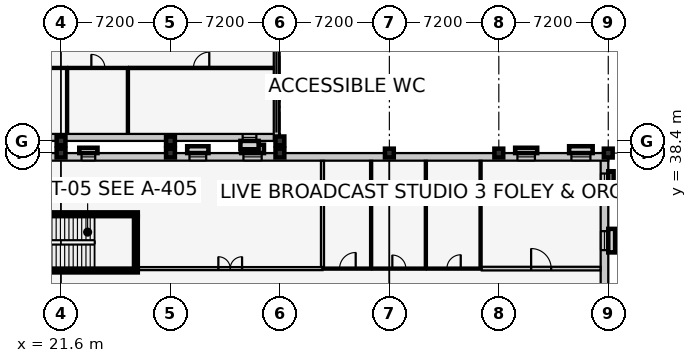
"""IFC4 building model, lengths in metres.
Left out: names, types, materials, properties, quantities, classifications, styles, units other than length and angle.
Written with IfcOpenShell. Run it as: python <this file> out.ifc"""

import sys

from ifc_helpers import new_model, si_unit, direction, frame, frame_2d, origin, origin_2d, place, context, subcontext, project, spatial, rectangle, extrude, element, fill, save


model = new_model("IFC4")
c1 = context("Model", 3, precision=1e-05, world=origin(), true_north=direction((0.0, 1.0)))
c2 = subcontext(c1, "Body", "Model", "MODEL_VIEW")
j1 = project(units=[si_unit("LENGTHUNIT", "METRE"), si_unit("PLANEANGLEUNIT", "RADIAN")], contexts=[c1])
p1 = place(None, origin())
s1 = spatial("IfcSite", under=j1, at=p1, CompositionType="ELEMENT")
p2 = place(p1, origin())
s2 = spatial("IfcBuilding", under=s1, at=p2, CompositionType="ELEMENT")
p3 = place(p2, origin())
s3 = spatial("IfcBuildingStorey", under=s2, at=p3, CompositionType="ELEMENT", Elevation=0.0)
for number, where, z_axis, x_axis in (
    (1, (21.6, 38.4, 0.0), (0.0, 0.0, 1.0), (1.0, 0.0, 0.0)),
    (2, (28.8, 38.4, 0.0), (0.0, 0.0, 1.0), (1.0, 0.0, 0.0)),
    (3, (36.0, 38.4, 0.0), (0.0, 0.0, 1.0), (1.0, 0.0, 0.0)),
    (4, (43.2, 38.4, 0.0), (0.0, 0.0, 1.0), (1.0, 0.0, 0.0)),
    (5, (50.4, 38.4, 0.0), (0.0, 0.0, 1.0), (1.0, 0.0, 0.0)),
    (6, (57.6, 38.4, 0.0), (0.0, 0.0, 1.0), (1.0, 0.0, 0.0)),
    (7, (21.6, 39.2, 0.0), (0.0, 0.0, 1.0), (1.0, 0.0, 0.0)),
    (8, (28.8, 39.2, 0.0), (0.0, 0.0, 1.0), (1.0, 0.0, 0.0)),
    (9, (36.0, 39.2, 0.0), (0.0, 0.0, 1.0), (1.0, 0.0, 0.0)),
):
    element("IfcColumn", number, at=place(p3, frame(where, z_axis=z_axis, x_axis=x_axis)), inside=s3, PredefinedType="COLUMN", context=c2, shape_type="SweptSolid", body=[
        extrude(rectangle(XDim=0.58, YDim=0.58, at=origin_2d()), origin(), (0.0, 0.0, 1.0), 5.4),
    ])
p4 = place(p3, frame((57.35, 38.4, 0.0), z_axis=(0.0, 0.0, 1.0), x_axis=(0.0, -1.0, 0.0)))
e10 = element("IfcWall", 10, at=p4, inside=s3, PredefinedType="SOLIDWALL", context=c2, shape_type="SweptSolid", body=[
    extrude(rectangle(XDim=38.4, YDim=0.5, at=frame_2d((19.2, 0.0))), origin(), (0.0, 0.0, 1.0), 4.255),
])
p5 = place(p4, frame((10.9, 0.0, 0.0)))
e11 = element("IfcOpeningElement", 11, at=p5, cuts=e10, PredefinedType="OPENING", context=c2, shape_type="SweptSolid", body=[
    extrude(rectangle(XDim=2.2, YDim=2.4, at=frame_2d((1.1, 1.2))), frame((0.0, 0.262, 0.0), z_axis=(0.0, -1.0, 0.0), x_axis=(1.0, 0.0, 0.0)), (0.0, 0.0, 1.0), 0.524),
])
p6 = place(p4, frame((1.345, 0.0, 0.9)))
e12 = element("IfcOpeningElement", 12, at=p6, cuts=e10, PredefinedType="OPENING", context=c2, shape_type="SweptSolid", body=[
    extrude(rectangle(XDim=1.15, YDim=1.45, at=frame_2d((0.575, 0.725))), frame((0.0, 0.262, 0.0), z_axis=(0.0, -1.0, 0.0), x_axis=(1.0, 0.0, 0.0)), (0.0, 0.0, 1.0), 0.524),
])
p7 = place(p4, frame((5.135, 0.0, 0.9)))
e13 = element("IfcOpeningElement", 13, at=p7, cuts=e10, PredefinedType="OPENING", context=c2, shape_type="SweptSolid", body=[
    extrude(rectangle(XDim=1.25, YDim=1.45, at=frame_2d((0.625, 0.725))), frame((0.0, 0.262, 0.0), z_axis=(0.0, -1.0, 0.0), x_axis=(1.0, 0.0, 0.0)), (0.0, 0.0, 1.0), 0.524),
])
p8 = place(p4, frame((20.595, 0.0, 0.9)))
e14 = element("IfcOpeningElement", 14, at=p8, cuts=e10, PredefinedType="OPENING", context=c2, shape_type="SweptSolid", body=[
    extrude(rectangle(XDim=1.05, YDim=1.6, at=frame_2d((0.525, 0.8))), frame((0.0, 0.262, 0.0), z_axis=(0.0, -1.0, 0.0), x_axis=(1.0, 0.0, 0.0)), (0.0, 0.0, 1.0), 0.524),
])
p9 = place(p4, frame((28.175, 0.0, 0.9)))
e15 = element("IfcOpeningElement", 15, at=p9, cuts=e10, PredefinedType="OPENING", context=c2, shape_type="SweptSolid", body=[
    extrude(rectangle(XDim=1.25, YDim=1.6, at=frame_2d((0.625, 0.8))), frame((0.0, 0.262, 0.0), z_axis=(0.0, -1.0, 0.0), x_axis=(1.0, 0.0, 0.0)), (0.0, 0.0, 1.0), 0.524),
])
p10 = place(p4, frame((35.73, 0.0, 0.9)))
e16 = element("IfcOpeningElement", 16, at=p10, cuts=e10, PredefinedType="OPENING", context=c2, shape_type="SweptSolid", body=[
    extrude(rectangle(XDim=1.5, YDim=1.6, at=frame_2d((0.75, 0.8))), frame((0.0, 0.262, 0.0), z_axis=(0.0, -1.0, 0.0), x_axis=(1.0, 0.0, 0.0)), (0.0, 0.0, 1.0), 0.524),
])
p11 = place(p3, frame((0.0, 38.15, 0.0), z_axis=(0.0, 0.0, 1.0), x_axis=(1.0, 0.0, 0.0)))
e17 = element("IfcWall", 17, at=p11, inside=s3, PredefinedType="SOLIDWALL", context=c2, shape_type="SweptSolid", body=[
    extrude(rectangle(XDim=57.6, YDim=0.5, at=frame_2d((28.8, 0.0))), origin(), (0.0, 0.0, 1.0), 4.395),
])
p12 = place(p11, frame((9.9, 0.0, 0.0)))
e18 = element("IfcOpeningElement", 18, at=p12, cuts=e17, PredefinedType="OPENING", context=c2, shape_type="SweptSolid", body=[
    extrude(rectangle(XDim=1.8, YDim=2.3, at=frame_2d((0.9, 1.15))), frame((0.0, 0.262, 0.0), z_axis=(0.0, -1.0, 0.0), x_axis=(1.0, 0.0, 0.0)), (0.0, 0.0, 1.0), 0.524),
])
p13 = place(p11, frame((1.3, 0.0, 0.9)))
e19 = element("IfcOpeningElement", 19, at=p13, cuts=e17, PredefinedType="OPENING", context=c2, shape_type="SweptSolid", body=[
    extrude(rectangle(XDim=1.0, YDim=1.75, at=frame_2d((0.5, 0.875))), frame((0.0, 0.262, 0.0), z_axis=(0.0, -1.0, 0.0), x_axis=(1.0, 0.0, 0.0)), (0.0, 0.0, 1.0), 0.524),
])
p14 = place(p11, frame((4.84, 0.0, 0.9)))
e20 = element("IfcOpeningElement", 20, at=p14, cuts=e17, PredefinedType="OPENING", context=c2, shape_type="SweptSolid", body=[
    extrude(rectangle(XDim=1.12, YDim=1.75, at=frame_2d((0.56, 0.875))), frame((0.0, 0.262, 0.0), z_axis=(0.0, -1.0, 0.0), x_axis=(1.0, 0.0, 0.0)), (0.0, 0.0, 1.0), 0.524),
])
p15 = place(p11, frame((15.48, 0.0, 0.9)))
e21 = element("IfcOpeningElement", 21, at=p15, cuts=e17, PredefinedType="OPENING", context=c2, shape_type="SweptSolid", body=[
    extrude(rectangle(XDim=1.44, YDim=1.75, at=frame_2d((0.72, 0.875))), frame((0.0, 0.262, 0.0), z_axis=(0.0, -1.0, 0.0), x_axis=(1.0, 0.0, 0.0)), (0.0, 0.0, 1.0), 0.524),
])
p16 = place(p11, frame((19.05, 0.0, 0.9)))
e22 = element("IfcOpeningElement", 22, at=p16, cuts=e17, PredefinedType="OPENING", context=c2, shape_type="SweptSolid", body=[
    extrude(rectangle(XDim=1.5, YDim=1.75, at=frame_2d((0.75, 0.875))), frame((0.0, 0.262, 0.0), z_axis=(0.0, -1.0, 0.0), x_axis=(1.0, 0.0, 0.0)), (0.0, 0.0, 1.0), 0.524),
])
p17 = place(p11, frame((22.95, 0.0, 0.9)))
e23 = element("IfcOpeningElement", 23, at=p17, cuts=e17, PredefinedType="OPENING", context=c2, shape_type="SweptSolid", body=[
    extrude(rectangle(XDim=0.9, YDim=1.35, at=frame_2d((0.45, 0.675))), frame((0.0, 0.262, 0.0), z_axis=(0.0, -1.0, 0.0), x_axis=(1.0, 0.0, 0.0)), (0.0, 0.0, 1.0), 0.524),
])
p18 = place(p11, frame((30.05, 0.0, 0.9)))
e24 = element("IfcOpeningElement", 24, at=p18, cuts=e17, PredefinedType="OPENING", context=c2, shape_type="SweptSolid", body=[
    extrude(rectangle(XDim=1.1, YDim=1.35, at=frame_2d((0.55, 0.675))), frame((0.0, 0.262, 0.0), z_axis=(0.0, -1.0, 0.0), x_axis=(1.0, 0.0, 0.0)), (0.0, 0.0, 1.0), 0.524),
])
p19 = place(p11, frame((33.6, 0.0, 0.9)))
e25 = element("IfcOpeningElement", 25, at=p19, cuts=e17, PredefinedType="OPENING", context=c2, shape_type="SweptSolid", body=[
    extrude(rectangle(XDim=1.2, YDim=1.35, at=frame_2d((0.6, 0.675))), frame((0.0, 0.262, 0.0), z_axis=(0.0, -1.0, 0.0), x_axis=(1.0, 0.0, 0.0)), (0.0, 0.0, 1.0), 0.524),
])
p20 = place(p11, frame((51.625, 0.0, 0.9)))
e26 = element("IfcOpeningElement", 26, at=p20, cuts=e17, PredefinedType="OPENING", context=c2, shape_type="SweptSolid", body=[
    extrude(rectangle(XDim=1.15, YDim=1.45, at=frame_2d((0.575, 0.725))), frame((0.0, 0.262, 0.0), z_axis=(0.0, -1.0, 0.0), x_axis=(1.0, 0.0, 0.0)), (0.0, 0.0, 1.0), 0.524),
])
p21 = place(p11, frame((55.175, 0.0, 0.9)))
e27 = element("IfcOpeningElement", 27, at=p21, cuts=e17, PredefinedType="OPENING", context=c2, shape_type="SweptSolid", body=[
    extrude(rectangle(XDim=1.25, YDim=1.45, at=frame_2d((0.625, 0.725))), frame((0.0, 0.262, 0.0), z_axis=(0.0, -1.0, 0.0), x_axis=(1.0, 0.0, 0.0)), (0.0, 0.0, 1.0), 0.524),
])
p22 = place(p3, frame((36.0, 39.43, 0.0), z_axis=(0.0, 0.0, 1.0), x_axis=(-1.0, 0.0, 0.0)))
e28 = element("IfcWall", 28, at=p22, inside=s3, PredefinedType="SOLIDWALL", context=c2, shape_type="SweptSolid", body=[
    extrude(rectangle(XDim=36.0, YDim=0.46, at=frame_2d((18.0, 0.0))), origin(), (0.0, 0.0, 1.0), 4.435),
])
p23 = place(p22, frame((1.55, 0.0, 0.9)))
e29 = element("IfcOpeningElement", 29, at=p23, cuts=e28, PredefinedType="OPENING", context=c2, shape_type="SweptSolid", body=[
    extrude(rectangle(XDim=0.9, YDim=1.6, at=frame_2d((0.45, 0.8))), frame((0.0, 0.242, 0.0), z_axis=(0.0, -1.0, 0.0), x_axis=(1.0, 0.0, 0.0)), (0.0, 0.0, 1.0), 0.484),
])
p24 = place(p22, frame((25.5, 0.0, 0.9)))
e30 = element("IfcOpeningElement", 30, at=p24, cuts=e28, PredefinedType="OPENING", context=c2, shape_type="SweptSolid", body=[
    extrude(rectangle(XDim=1.0, YDim=1.75, at=frame_2d((0.5, 0.875))), frame((0.0, 0.242, 0.0), z_axis=(0.0, -1.0, 0.0), x_axis=(1.0, 0.0, 0.0)), (0.0, 0.0, 1.0), 0.484),
])
p25 = place(p22, frame((33.38, 0.0, 0.9)))
e31 = element("IfcOpeningElement", 31, at=p25, cuts=e28, PredefinedType="OPENING", context=c2, shape_type="SweptSolid", body=[
    extrude(rectangle(XDim=1.24, YDim=1.75, at=frame_2d((0.62, 0.875))), frame((0.0, 0.242, 0.0), z_axis=(0.0, -1.0, 0.0), x_axis=(1.0, 0.0, 0.0)), (0.0, 0.0, 1.0), 0.484),
])
p26 = place(p3, frame((35.77, 68.0, 0.0), z_axis=(0.0, 0.0, 1.0), x_axis=(0.0, -1.0, 0.0)))
e32 = element("IfcWall", 32, at=p26, inside=s3, PredefinedType="SOLIDWALL", context=c2, shape_type="SweptSolid", body=[
    extrude(rectangle(XDim=28.8, YDim=0.35, at=frame_2d((14.4, 0.0))), origin(), (0.0, 0.0, 1.0), 0.85),
])
for number, where, z_axis, x_axis in (
    (33, (17.75, 30.675, 0.0), (0.0, 0.0, 1.0), (1.0, 0.0, 0.0)),
    (34, (26.65, 34.375, 0.0), (0.0, 0.0, 1.0), (-1.0, 0.0, 0.0)),
):
    element("IfcWall", number, at=place(p3, frame(where, z_axis=z_axis, x_axis=x_axis)), inside=s3, PredefinedType="SHEAR", context=c2, shape_type="SweptSolid", body=[
        extrude(rectangle(XDim=8.9, YDim=0.25, at=frame_2d((4.45, 0.0))), origin(), (0.0, 0.0, 1.0), 5.1),
    ])
p27 = place(p3, frame((26.525, 30.8, 0.0), z_axis=(0.0, 0.0, 1.0), x_axis=(0.0, 1.0, 0.0)))
e35 = element("IfcWall", 35, at=p27, inside=s3, PredefinedType="SHEAR", context=c2, shape_type="SweptSolid", body=[
    extrude(rectangle(XDim=3.45, YDim=0.25, at=frame_2d((1.725, 0.0))), origin(), (0.0, 0.0, 1.0), 5.1),
])
p28 = place(p3, frame((26.66, 30.8, 0.0), z_axis=(0.0, 0.0, 1.0), x_axis=(1.0, 0.0, 0.0)))
e36 = element("IfcWall", 36, at=p28, inside=s3, PredefinedType="PARTITIONING", context=c2, shape_type="SweptSolid", body=[
    extrude(rectangle(XDim=12.14, YDim=0.2, at=frame_2d((6.07, 0.0))), origin(), (0.0, 0.0, 1.0), 5.1),
])
p29 = place(p28, frame((5.29, 0.0, 0.0)))
e37 = element("IfcOpeningElement", 37, at=p29, cuts=e36, PredefinedType="OPENING", context=c2, shape_type="SweptSolid", body=[
    extrude(rectangle(XDim=1.56, YDim=2.25, at=frame_2d((0.78, 1.125))), frame((0.0, 0.112, 0.0), z_axis=(0.0, -1.0, 0.0), x_axis=(1.0, 0.0, 0.0)), (0.0, 0.0, 1.0), 0.224),
])
p30 = place(p3, frame((38.8, 30.91, 0.0), z_axis=(0.0, 0.0, 1.0), x_axis=(0.0, 1.0, 0.0)))
e38 = element("IfcWall", 38, at=p30, inside=s3, PredefinedType="PARTITIONING", context=c2, shape_type="SweptSolid", body=[
    extrude(rectangle(XDim=6.98, YDim=0.2, at=frame_2d((3.49, 0.0))), origin(), (0.0, 0.0, 1.0), 5.1),
])
p31 = place(p3, frame((38.91, 30.8, 0.0), z_axis=(0.0, 0.0, 1.0), x_axis=(1.0, 0.0, 0.0)))
e39 = element("IfcWall", 39, at=p31, inside=s3, PredefinedType="PARTITIONING", context=c2, shape_type="SweptSolid", body=[
    extrude(rectangle(XDim=3.09, YDim=0.14, at=frame_2d((1.545, 0.0))), origin(), (0.0, 0.0, 1.0), 5.1),
])
p32 = place(p31, frame((1.015, 0.0, 0.0)))
e40 = element("IfcOpeningElement", 40, at=p32, cuts=e39, PredefinedType="OPENING", context=c2, shape_type="SweptSolid", body=[
    extrude(rectangle(XDim=1.06, YDim=2.1, at=frame_2d((0.53, 1.05))), frame((0.0, 0.082, 0.0), z_axis=(0.0, -1.0, 0.0), x_axis=(1.0, 0.0, 0.0)), (0.0, 0.0, 1.0), 0.164),
])
p33 = place(p3, frame((42.0, 30.88, 0.0), z_axis=(0.0, 0.0, 1.0), x_axis=(0.0, 1.0, 0.0)))
e41 = element("IfcWall", 41, at=p33, inside=s3, PredefinedType="PARTITIONING", context=c2, shape_type="SweptSolid", body=[
    extrude(rectangle(XDim=7.01, YDim=0.14, at=frame_2d((3.505, 0.0))), origin(), (0.0, 0.0, 1.0), 5.1),
])
p34 = place(p3, frame((42.08, 30.8, 0.0), z_axis=(0.0, 0.0, 1.0), x_axis=(1.0, 0.0, 0.0)))
e42 = element("IfcWall", 42, at=p34, inside=s3, PredefinedType="PARTITIONING", context=c2, shape_type="SweptSolid", body=[
    extrude(rectangle(XDim=3.52, YDim=0.14, at=frame_2d((1.76, 0.0))), origin(), (0.0, 0.0, 1.0), 5.1),
])
p35 = place(p34, frame((1.315, 0.0, 0.0)))
e43 = element("IfcOpeningElement", 43, at=p35, cuts=e42, PredefinedType="OPENING", context=c2, shape_type="SweptSolid", body=[
    extrude(rectangle(XDim=0.89, YDim=2.05, at=frame_2d((0.445, 1.025))), frame((0.0, 0.082, 0.0), z_axis=(0.0, -1.0, 0.0), x_axis=(1.0, 0.0, 0.0)), (0.0, 0.0, 1.0), 0.164),
])
p36 = place(p3, frame((45.6, 30.88, 0.0), z_axis=(0.0, 0.0, 1.0), x_axis=(0.0, 1.0, 0.0)))
e44 = element("IfcWall", 44, at=p36, inside=s3, PredefinedType="PARTITIONING", context=c2, shape_type="SweptSolid", body=[
    extrude(rectangle(XDim=7.01, YDim=0.14, at=frame_2d((3.505, 0.0))), origin(), (0.0, 0.0, 1.0), 5.1),
])
p37 = place(p3, frame((45.68, 30.8, 0.0), z_axis=(0.0, 0.0, 1.0), x_axis=(1.0, 0.0, 0.0)))
e45 = element("IfcWall", 45, at=p37, inside=s3, PredefinedType="PARTITIONING", context=c2, shape_type="SweptSolid", body=[
    extrude(rectangle(XDim=3.52, YDim=0.14, at=frame_2d((1.76, 0.0))), origin(), (0.0, 0.0, 1.0), 5.1),
])
p38 = place(p37, frame((1.305, 0.0, 0.0)))
e46 = element("IfcOpeningElement", 46, at=p38, cuts=e45, PredefinedType="OPENING", context=c2, shape_type="SweptSolid", body=[
    extrude(rectangle(XDim=0.91, YDim=2.06, at=frame_2d((0.455, 1.03))), frame((0.0, 0.082, 0.0), z_axis=(0.0, -1.0, 0.0), x_axis=(1.0, 0.0, 0.0)), (0.0, 0.0, 1.0), 0.164),
])
p39 = place(p3, frame((49.2, 30.88, 0.0), z_axis=(0.0, 0.0, 1.0), x_axis=(0.0, 1.0, 0.0)))
e47 = element("IfcWall", 47, at=p39, inside=s3, PredefinedType="PARTITIONING", context=c2, shape_type="SweptSolid", body=[
    extrude(rectangle(XDim=7.01, YDim=0.14, at=frame_2d((3.505, 0.0))), origin(), (0.0, 0.0, 1.0), 5.1),
])
p40 = place(p3, frame((49.28, 30.8, 0.0), z_axis=(0.0, 0.0, 1.0), x_axis=(1.0, 0.0, 0.0)))
e48 = element("IfcWall", 48, at=p40, inside=s3, PredefinedType="PARTITIONING", context=c2, shape_type="SweptSolid", body=[
    extrude(rectangle(XDim=7.81, YDim=0.24, at=frame_2d((3.905, 0.0))), origin(), (0.0, 0.0, 1.0), 5.1),
])
p41 = place(p40, frame((3.245, 0.0, 0.0)))
e49 = element("IfcOpeningElement", 49, at=p41, cuts=e48, PredefinedType="OPENING", context=c2, shape_type="SweptSolid", body=[
    extrude(rectangle(XDim=1.32, YDim=2.15, at=frame_2d((0.66, 1.075))), frame((0.0, 0.132, 0.0), z_axis=(0.0, -1.0, 0.0), x_axis=(1.0, 0.0, 0.0)), (0.0, 0.0, 1.0), 0.264),
])
p42 = place(p3, frame((18.08, 44.0, 0.0), z_axis=(0.0, 0.0, 1.0), x_axis=(1.0, 0.0, 0.0)))
e50 = element("IfcWall", 50, at=p42, inside=s3, PredefinedType="PARTITIONING", context=c2, shape_type="SweptSolid", body=[
    extrude(rectangle(XDim=3.92, YDim=0.14, at=frame_2d((1.96, 0.0))), origin(), (0.0, 0.0, 1.0), 5.14),
])
p43 = place(p42, frame((1.505, 0.0, 0.0)))
e51 = element("IfcOpeningElement", 51, at=p43, cuts=e50, PredefinedType="OPENING", context=c2, shape_type="SweptSolid", body=[
    extrude(rectangle(XDim=0.91, YDim=2.06, at=frame_2d((0.455, 1.03))), frame((0.0, 0.082, 0.0), z_axis=(0.0, -1.0, 0.0), x_axis=(1.0, 0.0, 0.0)), (0.0, 0.0, 1.0), 0.164),
])
p44 = place(p3, frame((22.0, 39.67, 0.0), z_axis=(0.0, 0.0, 1.0), x_axis=(0.0, 1.0, 0.0)))
e52 = element("IfcWall", 52, at=p44, inside=s3, PredefinedType="PARTITIONING", context=c2, shape_type="SweptSolid", body=[
    extrude(rectangle(XDim=4.25, YDim=0.14, at=frame_2d((2.125, 0.0))), origin(), (0.0, 0.0, 1.0), 5.14),
])
p45 = place(p3, frame((22.08, 44.0, 0.0), z_axis=(0.0, 0.0, 1.0), x_axis=(1.0, 0.0, 0.0)))
e53 = element("IfcWall", 53, at=p45, inside=s3, PredefinedType="PARTITIONING", context=c2, shape_type="SweptSolid", body=[
    extrude(rectangle(XDim=3.92, YDim=0.14, at=frame_2d((1.96, 0.0))), origin(), (0.0, 0.0, 1.0), 5.14),
])
p46 = place(p45, frame((1.515, 0.0, 0.0)))
e54 = element("IfcOpeningElement", 54, at=p46, cuts=e53, PredefinedType="OPENING", context=c2, shape_type="SweptSolid", body=[
    extrude(rectangle(XDim=0.89, YDim=2.05, at=frame_2d((0.445, 1.025))), frame((0.0, 0.082, 0.0), z_axis=(0.0, -1.0, 0.0), x_axis=(1.0, 0.0, 0.0)), (0.0, 0.0, 1.0), 0.164),
])
p47 = place(p3, frame((26.0, 39.67, 0.0), z_axis=(0.0, 0.0, 1.0), x_axis=(0.0, 1.0, 0.0)))
e55 = element("IfcWall", 55, at=p47, inside=s3, PredefinedType="PARTITIONING", context=c2, shape_type="SweptSolid", body=[
    extrude(rectangle(XDim=4.25, YDim=0.14, at=frame_2d((2.125, 0.0))), origin(), (0.0, 0.0, 1.0), 5.14),
])
p48 = place(p3, frame((26.08, 44.0, 0.0), z_axis=(0.0, 0.0, 1.0), x_axis=(1.0, 0.0, 0.0)))
e56 = element("IfcWall", 56, at=p48, inside=s3, PredefinedType="PARTITIONING", context=c2, shape_type="SweptSolid", body=[
    extrude(rectangle(XDim=9.505, YDim=0.15, at=frame_2d((4.752, 0.0))), origin(), (0.0, 0.0, 1.0), 5.14),
])
p49 = place(p48, frame((4.232, 0.0, 0.0)))
e57 = element("IfcOpeningElement", 57, at=p49, cuts=e56, PredefinedType="OPENING", context=c2, shape_type="SweptSolid", body=[
    extrude(rectangle(XDim=1.04, YDim=2.15, at=frame_2d((0.52, 1.075))), frame((0.0, 0.087, 0.0), z_axis=(0.0, -1.0, 0.0), x_axis=(1.0, 0.0, 0.0)), (0.0, 0.0, 1.0), 0.174),
])
p50 = place(p6, origin())
e58 = element("IfcWindow", 58, at=p50, inside=s3, PartitioningType="SINGLE_PANEL", PredefinedType="WINDOW", context=c2, shape_type="SweptSolid", body=[
    extrude(rectangle(XDim=1.15, YDim=1.45, at=frame_2d((0.575, 0.725))), frame((0.0, 0.03, 0.0), z_axis=(0.0, -1.0, 0.0), x_axis=(1.0, 0.0, 0.0)), (0.0, 0.0, 1.0), 0.06),
])
fill(e12, e58)
p51 = place(p7, origin())
e59 = element("IfcWindow", 59, at=p51, inside=s3, PartitioningType="SINGLE_PANEL", PredefinedType="WINDOW", context=c2, shape_type="SweptSolid", body=[
    extrude(rectangle(XDim=1.25, YDim=1.45, at=frame_2d((0.625, 0.725))), frame((0.0, 0.03, 0.0), z_axis=(0.0, -1.0, 0.0), x_axis=(1.0, 0.0, 0.0)), (0.0, 0.0, 1.0), 0.06),
])
fill(e13, e59)
p52 = place(p17, origin())
e60 = element("IfcWindow", 60, at=p52, inside=s3, PartitioningType="SINGLE_PANEL", PredefinedType="WINDOW", context=c2, shape_type="SweptSolid", body=[
    extrude(rectangle(XDim=0.9, YDim=1.35, at=frame_2d((0.45, 0.675))), frame((0.0, 0.03, 0.0), z_axis=(0.0, -1.0, 0.0), x_axis=(1.0, 0.0, 0.0)), (0.0, 0.0, 1.0), 0.06),
])
fill(e23, e60)
p53 = place(p18, origin())
e61 = element("IfcWindow", 61, at=p53, inside=s3, PartitioningType="SINGLE_PANEL", PredefinedType="WINDOW", context=c2, shape_type="SweptSolid", body=[
    extrude(rectangle(XDim=1.1, YDim=1.35, at=frame_2d((0.55, 0.675))), frame((0.0, 0.03, 0.0), z_axis=(0.0, -1.0, 0.0), x_axis=(1.0, 0.0, 0.0)), (0.0, 0.0, 1.0), 0.06),
])
fill(e24, e61)
p54 = place(p19, origin())
e62 = element("IfcWindow", 62, at=p54, inside=s3, PartitioningType="SINGLE_PANEL", PredefinedType="WINDOW", context=c2, shape_type="SweptSolid", body=[
    extrude(rectangle(XDim=1.2, YDim=1.35, at=frame_2d((0.6, 0.675))), frame((0.0, 0.03, 0.0), z_axis=(0.0, -1.0, 0.0), x_axis=(1.0, 0.0, 0.0)), (0.0, 0.0, 1.0), 0.06),
])
fill(e25, e62)
p55 = place(p20, origin())
e63 = element("IfcWindow", 63, at=p55, inside=s3, PartitioningType="SINGLE_PANEL", PredefinedType="WINDOW", context=c2, shape_type="SweptSolid", body=[
    extrude(rectangle(XDim=1.15, YDim=1.45, at=frame_2d((0.575, 0.725))), frame((0.0, 0.03, 0.0), z_axis=(0.0, -1.0, 0.0), x_axis=(1.0, 0.0, 0.0)), (0.0, 0.0, 1.0), 0.06),
])
fill(e26, e63)
p56 = place(p21, origin())
e64 = element("IfcWindow", 64, at=p56, inside=s3, PartitioningType="SINGLE_PANEL", PredefinedType="WINDOW", context=c2, shape_type="SweptSolid", body=[
    extrude(rectangle(XDim=1.25, YDim=1.45, at=frame_2d((0.625, 0.725))), frame((0.0, 0.03, 0.0), z_axis=(0.0, -1.0, 0.0), x_axis=(1.0, 0.0, 0.0)), (0.0, 0.0, 1.0), 0.06),
])
fill(e27, e64)
p57 = place(p23, origin())
e65 = element("IfcWindow", 65, at=p57, inside=s3, PartitioningType="SINGLE_PANEL", PredefinedType="WINDOW", context=c2, shape_type="SweptSolid", body=[
    extrude(rectangle(XDim=0.9, YDim=1.6, at=frame_2d((0.45, 0.8))), frame((0.0, 0.03, 0.0), z_axis=(0.0, -1.0, 0.0), x_axis=(1.0, 0.0, 0.0)), (0.0, 0.0, 1.0), 0.06),
])
fill(e29, e65)
p58 = place(p29, origin())
e66 = element("IfcDoor", 66, at=p58, inside=s3, OperationType="DOUBLE_DOOR_SINGLE_SWING", PredefinedType="DOOR", context=c2, shape_type="SweptSolid", body=[
    extrude(rectangle(XDim=1.56, YDim=2.25, at=frame_2d((0.78, 1.125))), frame((0.0, 0.025, 0.0), z_axis=(0.0, -1.0, 0.0), x_axis=(1.0, 0.0, 0.0)), (0.0, 0.0, 1.0), 0.05),
])
fill(e37, e66)
p59 = place(p32, origin())
e67 = element("IfcDoor", 67, at=p59, inside=s3, OperationType="SINGLE_SWING_RIGHT", PredefinedType="DOOR", context=c2, shape_type="SweptSolid", body=[
    extrude(rectangle(XDim=1.06, YDim=2.1, at=frame_2d((0.53, 1.05))), frame((0.0, 0.025, 0.0), z_axis=(0.0, -1.0, 0.0), x_axis=(1.0, 0.0, 0.0)), (0.0, 0.0, 1.0), 0.05),
])
fill(e40, e67)
p60 = place(p35, origin())
e68 = element("IfcDoor", 68, at=p60, inside=s3, OperationType="SINGLE_SWING_LEFT", PredefinedType="DOOR", context=c2, shape_type="SweptSolid", body=[
    extrude(rectangle(XDim=0.89, YDim=2.05, at=frame_2d((0.445, 1.025))), frame((0.0, 0.025, 0.0), z_axis=(0.0, -1.0, 0.0), x_axis=(1.0, 0.0, 0.0)), (0.0, 0.0, 1.0), 0.05),
])
fill(e43, e68)
p61 = place(p38, origin())
e69 = element("IfcDoor", 69, at=p61, inside=s3, OperationType="SINGLE_SWING_RIGHT", PredefinedType="DOOR", context=c2, shape_type="SweptSolid", body=[
    extrude(rectangle(XDim=0.91, YDim=2.06, at=frame_2d((0.455, 1.03))), frame((0.0, 0.025, 0.0), z_axis=(0.0, -1.0, 0.0), x_axis=(1.0, 0.0, 0.0)), (0.0, 0.0, 1.0), 0.05),
])
fill(e46, e69)
p62 = place(p41, origin())
e70 = element("IfcDoor", 70, at=p62, inside=s3, OperationType="SINGLE_SWING_LEFT", PredefinedType="DOOR", context=c2, shape_type="SweptSolid", body=[
    extrude(rectangle(XDim=1.32, YDim=2.15, at=frame_2d((0.66, 1.075))), frame((0.0, 0.025, 0.0), z_axis=(0.0, -1.0, 0.0), x_axis=(1.0, 0.0, 0.0)), (0.0, 0.0, 1.0), 0.05),
])
fill(e49, e70)
p63 = place(p46, origin())
e71 = element("IfcDoor", 71, at=p63, inside=s3, OperationType="SINGLE_SWING_LEFT", PredefinedType="DOOR", context=c2, shape_type="SweptSolid", body=[
    extrude(rectangle(XDim=0.89, YDim=2.05, at=frame_2d((0.445, 1.025))), frame((0.0, 0.025, 0.0), z_axis=(0.0, -1.0, 0.0), x_axis=(1.0, 0.0, 0.0)), (0.0, 0.0, 1.0), 0.05),
])
fill(e54, e71)
p64 = place(p49, origin())
e72 = element("IfcDoor", 72, at=p64, inside=s3, OperationType="SINGLE_SWING_RIGHT", PredefinedType="DOOR", context=c2, shape_type="SweptSolid", body=[
    extrude(rectangle(XDim=1.04, YDim=2.15, at=frame_2d((0.52, 1.075))), frame((0.0, 0.025, 0.0), z_axis=(0.0, -1.0, 0.0), x_axis=(1.0, 0.0, 0.0)), (0.0, 0.0, 1.0), 0.05),
])
fill(e57, e72)
save(model, sys.argv[1])
